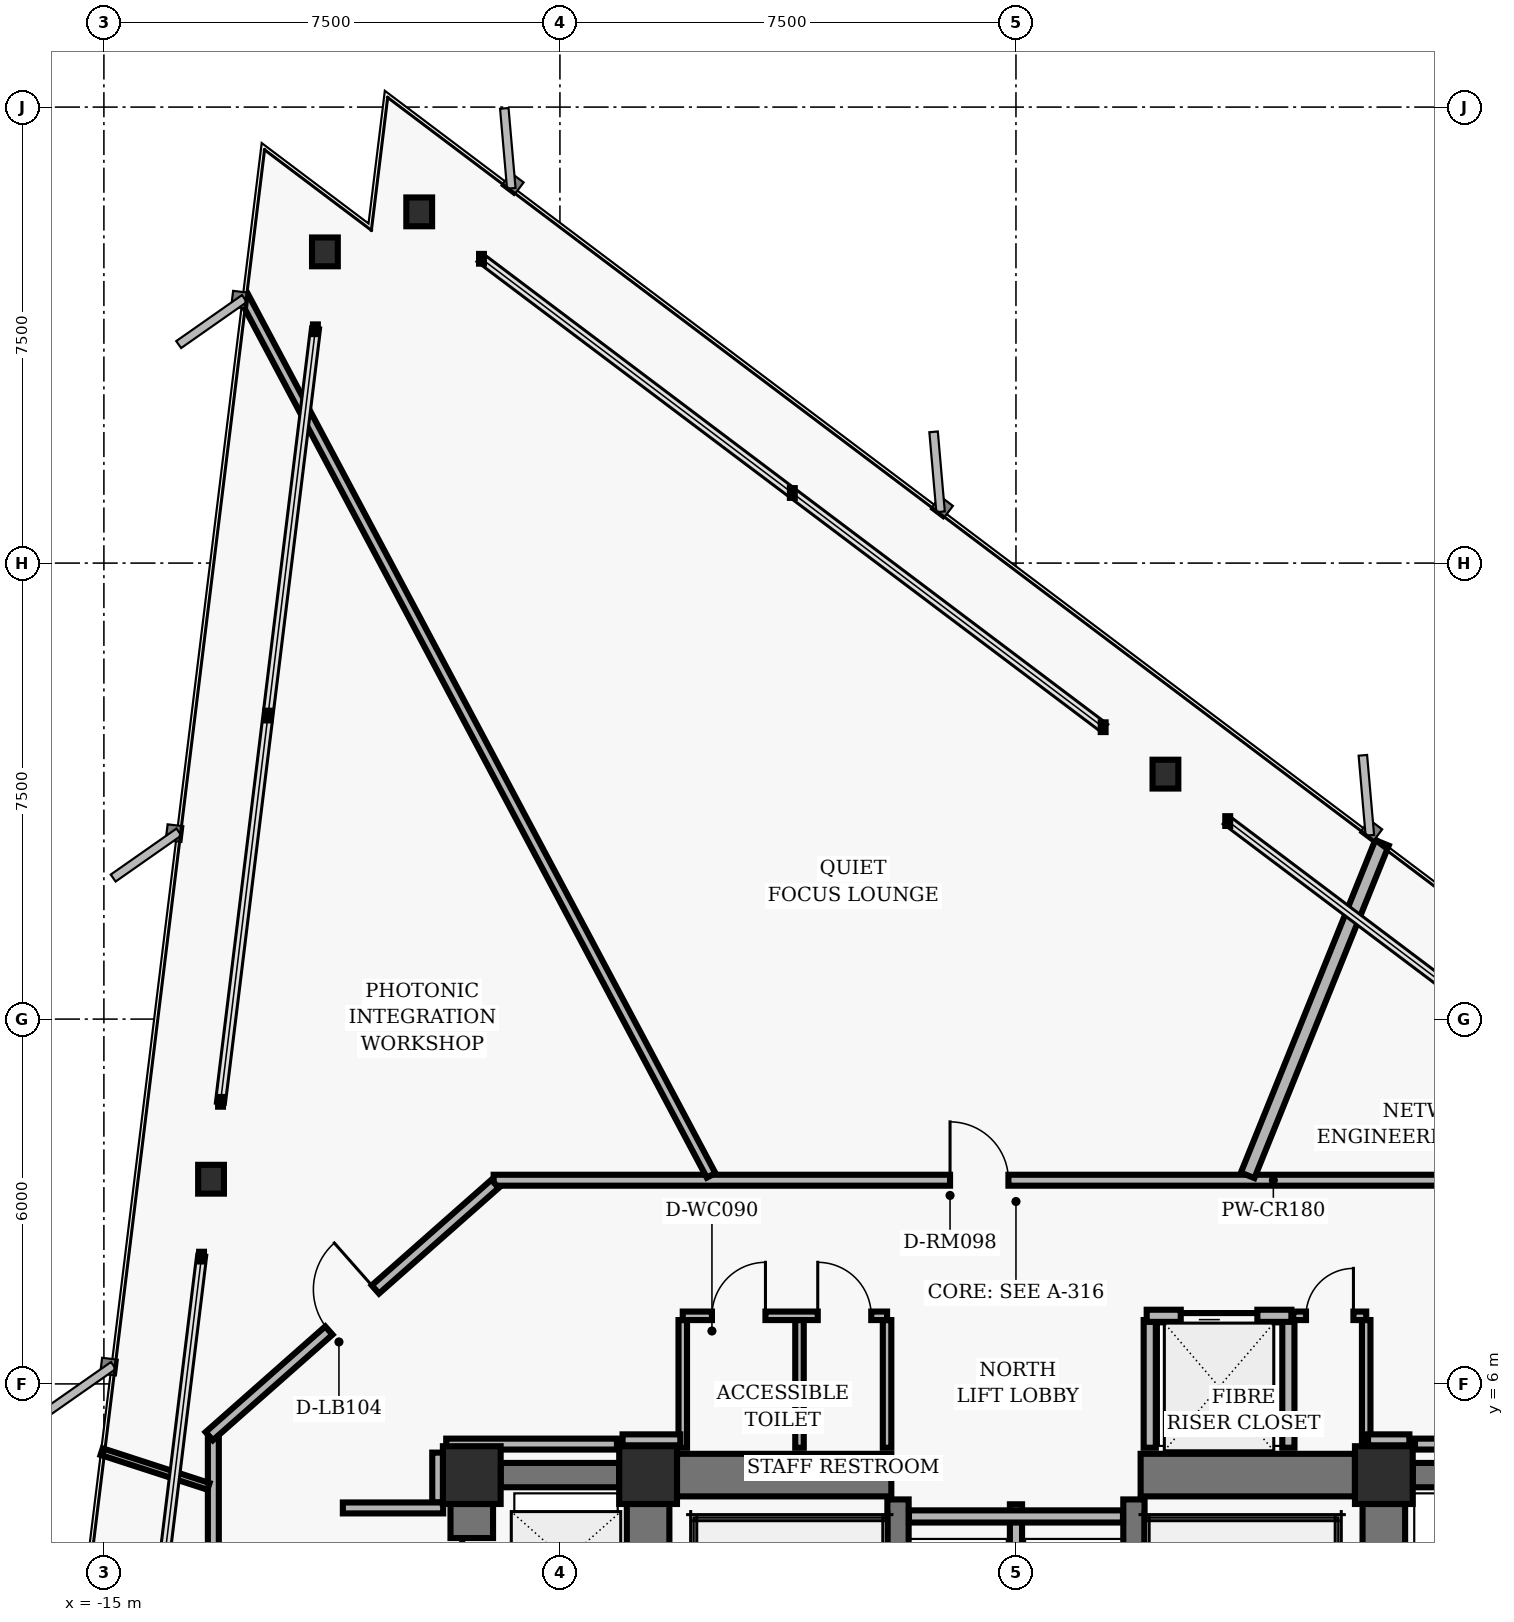
"""IFC4 building model, lengths in metres.
Left out: names, types, materials, properties, quantities, classifications, styles, units other than length and angle.
Written with IfcOpenShell. Run it as: python <this file> out.ifc"""

import sys

from ifc_helpers import new_model, si_unit, direction, frame, frame_2d, origin, origin_2d, place, context, subcontext, project, spatial, rectangle, hollow_rectangle, i_section, extrude, element, fill, save


model = new_model("IFC4")
c1 = context("Model", 3, precision=1e-05, world=origin(), true_north=direction((0.0, 1.0)))
c2 = subcontext(c1, "Body", "Model", "MODEL_VIEW")
j1 = project(units=[si_unit("LENGTHUNIT", "METRE"), si_unit("PLANEANGLEUNIT", "RADIAN")], contexts=[c1])
p1 = place(None, origin())
s1 = spatial("IfcSite", under=j1, at=p1, CompositionType="ELEMENT")
p2 = place(p1, origin())
s2 = spatial("IfcBuilding", under=s1, at=p2, CompositionType="ELEMENT")
p3 = place(p2, frame((0.0, 0.0, 56.32)))
s3 = spatial("IfcBuildingStorey", under=s2, at=p3, CompositionType="ELEMENT", Elevation=56.32)
for number, where, z_axis, x_axis in (
    (1, (-6.05, 4.5, 0.0), (0.0, 0.0, 1.0), (1.0, 0.0, 0.0)),
    (2, (6.05, 4.5, 0.0), (0.0, 0.0, 1.0), (1.0, 0.0, 0.0)),
    (3, (-8.95, 4.5, 0.0), (0.0, 0.0, 1.0), (1.0, 0.0, 0.0)),
):
    element("IfcColumn", number, at=place(p3, frame(where, z_axis=z_axis, x_axis=x_axis)), inside=s3, PredefinedType="COLUMN", context=c2, shape_type="SweptSolid", body=[
        extrude(hollow_rectangle(XDim=0.95, YDim=0.95, WallThickness=0.06, InnerFilletRadius=0.02, OuterFilletRadius=0.04, at=origin_2d()), origin(), (0.0, 0.0, 1.0), 3.36),
    ])
for number, where, z_axis, x_axis in (
    (4, (-6.05, 0.475, 0.0), (0.0, 0.0, 1.0), (0.0, 1.0, 0.0)),
    (5, (6.05, 0.475, 0.0), (0.0, 0.0, 1.0), (0.0, 1.0, 0.0)),
):
    element("IfcWall", number, at=place(p3, frame(where, z_axis=z_axis, x_axis=x_axis)), inside=s3, PredefinedType="SHEAR", context=c2, shape_type="SweptSolid", body=[
        extrude(rectangle(XDim=3.55, YDim=0.7, at=frame_2d((1.775, 0.0))), origin(), (0.0, 0.0, 1.0), 3.098),
    ])
for number, where, z_axis, x_axis in (
    (6, (-1.94, -4.1, 0.0), (0.0, 0.0, 1.0), (0.0, 1.0, 0.0)),
    (7, (1.94, -4.1, 0.0), (0.0, 0.0, 1.0), (0.0, 1.0, 0.0)),
):
    element("IfcWall", number, at=place(p3, frame(where, z_axis=z_axis, x_axis=x_axis)), inside=s3, PredefinedType="SHEAR", context=c2, shape_type="SweptSolid", body=[
        extrude(rectangle(XDim=8.2, YDim=0.35, at=frame_2d((4.1, 0.0))), origin(), (0.0, 0.0, 1.0), 3.098),
    ])
for number, where, z_axis, x_axis in (
    (8, (-5.575, 4.5, 0.0), (0.0, 0.0, 1.0), (1.0, 0.0, 0.0)),
    (9, (2.05, 4.5, 0.0), (0.0, 0.0, 1.0), (1.0, 0.0, 0.0)),
):
    element("IfcWall", number, at=place(p3, frame(where, z_axis=z_axis, x_axis=x_axis)), inside=s3, PredefinedType="SHEAR", context=c2, shape_type="SweptSolid", body=[
        extrude(rectangle(XDim=3.525, YDim=0.7, at=frame_2d((1.762, 0.0))), origin(), (0.0, 0.0, 1.0), 3.098),
    ])
p4 = place(p3, frame((-8.95, -3.825, 0.0), z_axis=(0.0, 0.0, 1.0), x_axis=(0.0, 1.0, 0.0)))
e10 = element("IfcWall", 10, at=p4, inside=s3, PredefinedType="SHEAR", context=c2, shape_type="SweptSolid", body=[
    extrude(rectangle(XDim=7.85, YDim=0.7, at=frame_2d((3.925, 0.0))), origin(), (0.0, 0.0, 1.0), 3.098),
])
p5 = place(p4, frame((0.55, 0.0, 0.0)))
e11 = element("IfcOpeningElement", 11, at=p5, cuts=e10, PredefinedType="OPENING", context=c2, shape_type="SweptSolid", body=[
    extrude(rectangle(XDim=1.06, YDim=2.04, at=frame_2d((0.53, 1.02))), frame((0.0, 0.36, 0.0), z_axis=(0.0, -1.0, 0.0), x_axis=(1.0, 0.0, 0.0)), (0.0, 0.0, 1.0), 0.72),
])
p6 = place(p4, frame((3.395, 0.0, 0.0)))
e12 = element("IfcOpeningElement", 12, at=p6, cuts=e10, PredefinedType="OPENING", context=c2, shape_type="SweptSolid", body=[
    extrude(rectangle(XDim=1.06, YDim=2.04, at=frame_2d((0.53, 1.02))), frame((0.0, 0.36, 0.0), z_axis=(0.0, -1.0, 0.0), x_axis=(1.0, 0.0, 0.0)), (0.0, 0.0, 1.0), 0.72),
])
p7 = place(p4, frame((6.23, 0.0, 0.0)))
e13 = element("IfcOpeningElement", 13, at=p7, cuts=e10, PredefinedType="OPENING", context=c2, shape_type="SweptSolid", body=[
    extrude(rectangle(XDim=1.06, YDim=2.04, at=frame_2d((0.53, 1.02))), frame((0.0, 0.36, 0.0), z_axis=(0.0, -1.0, 0.0), x_axis=(1.0, 0.0, 0.0)), (0.0, 0.0, 1.0), 0.72),
])
for number, where, z_axis, x_axis in (
    (14, (-8.475, 4.5, 0.0), (0.0, 0.0, 1.0), (1.0, 0.0, 0.0)),
    (15, (6.525, 4.5, 0.0), (0.0, 0.0, 1.0), (1.0, 0.0, 0.0)),
):
    element("IfcWall", number, at=place(p3, frame(where, z_axis=z_axis, x_axis=x_axis)), inside=s3, PredefinedType="SHEAR", context=c2, shape_type="SweptSolid", body=[
        extrude(rectangle(XDim=1.95, YDim=0.4, at=frame_2d((0.975, 0.0))), origin(), (0.0, 0.0, 1.0), 3.098),
    ])
for number, where, z_axis, x_axis in (
    (16, (2.458, 16.029, 0.0), (0.0, 0.0, 1.0), (1.0, 0.0, 0.0)),
    (17, (-9.814, 25.277, 0.0), (0.0, 0.0, 1.0), (1.0, 0.0, 0.0)),
    (18, (-11.365, 24.619, 0.0), (0.0, 0.0, 1.0), (1.0, 0.0, 0.0)),
    (19, (-13.238, 9.366, 0.0), (0.0, 0.0, 1.0), (1.0, 0.0, 0.0)),
):
    element("IfcColumn", number, at=place(p3, frame(where, z_axis=z_axis, x_axis=x_axis)), inside=s3, PredefinedType="COLUMN", context=c2, shape_type="SweptSolid", body=[
        extrude(i_section(OverallWidth=0.424, OverallDepth=0.474, WebThickness=0.048, FlangeThickness=0.077, FilletRadius=0.025, at=origin_2d()), origin(), (0.0, 0.0, 1.0), 3.36),
    ])
p8 = place(p3, frame((0.0, 1.25, 0.0), z_axis=(0.0, 0.0, 1.0), x_axis=(0.0, 1.0, 0.0)))
e20 = element("IfcWall", 20, at=p8, inside=s3, PredefinedType="PARTITIONING", context=c2, shape_type="SweptSolid", body=[
    extrude(rectangle(XDim=2.77, YDim=0.2, at=frame_2d((1.385, 0.0))), origin(), (0.0, 0.0, 1.0), 3.073),
])
p9 = place(p3, frame((-1.76, 3.82, 0.0), z_axis=(0.0, 0.0, 1.0), x_axis=(1.0, 0.0, 0.0)))
e21 = element("IfcWall", 21, at=p9, inside=s3, PredefinedType="PARTITIONING", context=c2, shape_type="SweptSolid", body=[
    extrude(rectangle(XDim=3.52, YDim=0.2, at=frame_2d((1.76, 0.0))), origin(), (0.0, 0.0, 1.0), 3.073),
])
for number, where, z_axis, x_axis in (
    (22, (2.2, 4.95, 0.0), (0.0, 0.0, 1.0), (0.0, 1.0, 0.0)),
    (23, (4.48, 4.95, 0.0), (0.0, 0.0, 1.0), (0.0, 1.0, 0.0)),
):
    element("IfcWall", number, at=place(p3, frame(where, z_axis=z_axis, x_axis=x_axis)), inside=s3, PredefinedType="PARTITIONING", context=c2, shape_type="SweptSolid", body=[
        extrude(rectangle(XDim=2.1, YDim=0.2, at=frame_2d((1.05, 0.0))), origin(), (0.0, 0.0, 1.0), 3.073),
    ])
p10 = place(p3, frame((2.15, 7.12, 0.0), z_axis=(0.0, 0.0, 1.0), x_axis=(1.0, 0.0, 0.0)))
e24 = element("IfcWall", 24, at=p10, inside=s3, PredefinedType="PARTITIONING", context=c2, shape_type="SweptSolid", body=[
    extrude(rectangle(XDim=2.38, YDim=0.2, at=frame_2d((1.19, 0.0))), origin(), (0.0, 0.0, 1.0), 2.587),
])
p11 = place(p10, frame((0.56, 0.0, 0.0)))
e25 = element("IfcOpeningElement", 25, at=p11, cuts=e24, PredefinedType="OPENING", context=c2, shape_type="SweptSolid", body=[
    extrude(rectangle(XDim=1.26, YDim=2.06, at=frame_2d((0.63, 1.03))), frame((0.0, 0.11, 0.0), z_axis=(0.0, -1.0, 0.0), x_axis=(1.0, 0.0, 0.0)), (0.0, 0.0, 1.0), 0.22),
])
for number, where, z_axis, x_axis in (
    (26, (-5.48, 4.95, 0.0), (0.0, 0.0, 1.0), (0.0, 1.0, 0.0)),
    (27, (-3.56, 4.95, 0.0), (0.0, 0.0, 1.0), (0.0, 1.0, 0.0)),
    (28, (-2.12, 4.95, 0.0), (0.0, 0.0, 1.0), (0.0, 1.0, 0.0)),
):
    element("IfcWall", number, at=place(p3, frame(where, z_axis=z_axis, x_axis=x_axis)), inside=s3, PredefinedType="PARTITIONING", context=c2, shape_type="SweptSolid", body=[
        extrude(rectangle(XDim=2.1, YDim=0.14, at=frame_2d((1.05, 0.0))), origin(), (0.0, 0.0, 1.0), 3.073),
    ])
p12 = place(p3, frame((-5.48, 7.12, 0.0), z_axis=(0.0, 0.0, 1.0), x_axis=(1.0, 0.0, 0.0)))
e29 = element("IfcWall", 29, at=p12, inside=s3, PredefinedType="PARTITIONING", context=c2, shape_type="SweptSolid", body=[
    extrude(rectangle(XDim=3.36, YDim=0.14, at=frame_2d((1.68, 0.0))), origin(), (0.0, 0.0, 1.0), 3.073),
])
p13 = place(p12, frame((0.48, 0.0, 0.0)))
e30 = element("IfcOpeningElement", 30, at=p13, cuts=e29, PredefinedType="OPENING", context=c2, shape_type="SweptSolid", body=[
    extrude(rectangle(XDim=0.88, YDim=2.02, at=frame_2d((0.44, 1.01))), frame((0.0, 0.08, 0.0), z_axis=(0.0, -1.0, 0.0), x_axis=(1.0, 0.0, 0.0)), (0.0, 0.0, 1.0), 0.16),
])
p14 = place(p12, frame((2.22, 0.0, 0.0)))
e31 = element("IfcOpeningElement", 31, at=p14, cuts=e29, PredefinedType="OPENING", context=c2, shape_type="SweptSolid", body=[
    extrude(rectangle(XDim=0.88, YDim=2.02, at=frame_2d((0.44, 1.01))), frame((0.0, 0.08, 0.0), z_axis=(0.0, -1.0, 0.0), x_axis=(1.0, 0.0, 0.0)), (0.0, 0.0, 1.0), 0.16),
])
p15 = place(p3, frame((5.76, 4.95, 0.0), z_axis=(0.0, 0.0, 1.0), x_axis=(0.0, 1.0, 0.0)))
e32 = element("IfcWall", 32, at=p15, inside=s3, PredefinedType="PARTITIONING", context=c2, shape_type="SweptSolid", body=[
    extrude(rectangle(XDim=2.1, YDim=0.14, at=frame_2d((1.05, 0.0))), origin(), (0.0, 0.0, 1.0), 3.073),
])
p16 = place(p3, frame((4.56, 7.12, 0.0), z_axis=(0.0, 0.0, 1.0), x_axis=(1.0, 0.0, 0.0)))
e33 = element("IfcWall", 33, at=p16, inside=s3, PredefinedType="PARTITIONING", context=c2, shape_type="SweptSolid", body=[
    extrude(rectangle(XDim=1.2, YDim=0.14, at=frame_2d((0.6, 0.0))), origin(), (0.0, 0.0, 1.0), 2.587),
])
p17 = place(p16, frame((0.21, 0.0, 0.0)))
e34 = element("IfcOpeningElement", 34, at=p17, cuts=e33, PredefinedType="OPENING", context=c2, shape_type="SweptSolid", body=[
    extrude(rectangle(XDim=0.78, YDim=2.01, at=frame_2d((0.39, 1.005))), frame((0.0, 0.08, 0.0), z_axis=(0.0, -1.0, 0.0), x_axis=(1.0, 0.0, 0.0)), (0.0, 0.0, 1.0), 0.16),
])
p18 = place(p3, frame((-8.59, 9.35, 0.0), z_axis=(0.0, 0.0, 1.0), x_axis=(1.0, 0.0, 0.0)))
e35 = element("IfcWall", 35, at=p18, inside=s3, PredefinedType="PARTITIONING", context=c2, shape_type="SweptSolid", body=[
    extrude(rectangle(XDim=17.18, YDim=0.18, at=frame_2d((8.59, 0.0))), origin(), (0.0, 0.0, 1.0), 3.073),
])
p19 = place(p18, frame((7.506, 0.0, 0.0)))
e36 = element("IfcOpeningElement", 36, at=p19, cuts=e35, PredefinedType="OPENING", context=c2, shape_type="SweptSolid", body=[
    extrude(rectangle(XDim=0.96, YDim=2.02, at=frame_2d((0.48, 1.01))), frame((0.0, 0.1, 0.0), z_axis=(0.0, -1.0, 0.0), x_axis=(1.0, 0.0, 0.0)), (0.0, 0.0, 1.0), 0.2),
])
p20 = place(p3, frame((-13.2, -5.11, 0.0), z_axis=(0.0, 0.0, 1.0), x_axis=(0.0, 1.0, 0.0)))
e37 = element("IfcWall", 37, at=p20, inside=s3, PredefinedType="PARTITIONING", context=c2, shape_type="SweptSolid", body=[
    extrude(rectangle(XDim=10.22, YDim=0.18, at=frame_2d((5.11, 0.0))), origin(), (0.0, 0.0, 1.0), 2.587),
])
p21 = place(p20, frame((5.132, 0.0, 0.0)))
e38 = element("IfcOpeningElement", 38, at=p21, cuts=e37, PredefinedType="OPENING", context=c2, shape_type="SweptSolid", body=[
    extrude(rectangle(XDim=0.96, YDim=2.02, at=frame_2d((0.48, 1.01))), frame((0.0, 0.1, 0.0), z_axis=(0.0, -1.0, 0.0), x_axis=(1.0, 0.0, 0.0)), (0.0, 0.0, 1.0), 0.2),
])
p22 = place(p3, frame((-13.268, 5.14, 0.0), z_axis=(0.0, 0.0, 1.0), x_axis=(0.749626463267, 0.66186113768, 0.0)))
e39 = element("IfcWall", 39, at=p22, inside=s3, PredefinedType="PARTITIONING", context=c2, shape_type="SweptSolid", body=[
    extrude(rectangle(XDim=6.27, YDim=0.18, at=frame_2d((3.135, 0.0))), origin(), (0.0, 0.0, 1.0), 3.073),
])
p23 = place(p22, frame((2.625, 0.0, 0.0)))
e40 = element("IfcOpeningElement", 40, at=p23, cuts=e39, PredefinedType="OPENING", context=c2, shape_type="SweptSolid", body=[
    extrude(rectangle(XDim=1.02, YDim=2.02, at=frame_2d((0.51, 1.01))), frame((0.0, 0.1, 0.0), z_axis=(0.0, -1.0, 0.0), x_axis=(1.0, 0.0, 0.0)), (0.0, 0.0, 1.0), 0.2),
])
p24 = place(p3, frame((-9.51, 4.87, 0.0), z_axis=(0.0, 0.0, 1.0), x_axis=(0.0, -1.0, 0.0)))
e41 = element("IfcWall", 41, at=p24, inside=s3, PredefinedType="PARTITIONING", context=c2, shape_type="SweptSolid", body=[
    extrude(rectangle(XDim=0.82, YDim=0.18, at=frame_2d((0.41, 0.0))), origin(), (0.0, 0.0, 1.0), 3.073),
])
p25 = place(p3, frame((-9.42, 3.96, 0.0), z_axis=(0.0, 0.0, 1.0), x_axis=(-1.0, 0.0, 0.0)))
e42 = element("IfcWall", 42, at=p25, inside=s3, PredefinedType="PARTITIONING", context=c2, shape_type="SweptSolid", body=[
    extrude(rectangle(XDim=1.65, YDim=0.18, at=frame_2d((0.825, 0.0))), origin(), (0.0, 0.0, 1.0), 3.073),
])
p26 = place(p3, frame((9.37, 5.01, 0.0), z_axis=(0.0, 0.0, 1.0), x_axis=(-1.0, 0.0, 0.0)))
e43 = element("IfcWall", 43, at=p26, inside=s3, PredefinedType="PARTITIONING", context=c2, shape_type="SweptSolid", body=[
    extrude(rectangle(XDim=2.808, YDim=0.18, at=frame_2d((1.404, 0.0))), origin(), (0.0, 0.0, 1.0), 3.073),
])
p27 = place(p3, frame((6.47, 5.08, 0.0), z_axis=(0.0, 0.0, 1.0), x_axis=(-1.0, 0.0, 0.0)))
e44 = element("IfcWall", 44, at=p27, inside=s3, PredefinedType="PARTITIONING", context=c2, shape_type="SweptSolid", body=[
    extrude(rectangle(XDim=0.68, YDim=0.18, at=frame_2d((0.34, 0.0))), origin(), (0.0, 0.0, 1.0), 3.073),
])
p28 = place(p3, frame((-5.52, 5.08, 0.0), z_axis=(0.0, 0.0, 1.0), x_axis=(-1.0, 0.0, 0.0)))
e45 = element("IfcWall", 45, at=p28, inside=s3, PredefinedType="PARTITIONING", context=c2, shape_type="SweptSolid", body=[
    extrude(rectangle(XDim=0.95, YDim=0.18, at=frame_2d((0.475, 0.0))), origin(), (0.0, 0.0, 1.0), 3.073),
])
p29 = place(p3, frame((-6.562, 5.01, 0.0), z_axis=(0.0, 0.0, 1.0), x_axis=(-1.0, 0.0, 0.0)))
e46 = element("IfcWall", 46, at=p29, inside=s3, PredefinedType="PARTITIONING", context=c2, shape_type="SweptSolid", body=[
    extrude(rectangle(XDim=2.808, YDim=0.18, at=frame_2d((1.404, 0.0))), origin(), (0.0, 0.0, 1.0), 3.073),
])
p30 = place(p3, frame((3.81, 9.43, 0.0), z_axis=(0.0, 0.0, 1.0), x_axis=(0.374593091461, 0.927189309596, 0.0)))
e47 = element("IfcWall", 47, at=p30, inside=s3, PredefinedType="PARTITIONING", context=c2, shape_type="SweptSolid", body=[
    extrude(rectangle(XDim=5.898, YDim=0.24, at=frame_2d((2.949, 0.0))), origin(), (0.0, 0.0, 1.0), 3.073),
])
p31 = place(p3, frame((-5.014, 9.43, 0.0), z_axis=(0.0, 0.0, 1.0), x_axis=(-0.469473054772, 0.882946799554, 0.0)))
e48 = element("IfcWall", 48, at=p31, inside=s3, PredefinedType="PARTITIONING", context=c2, shape_type="SweptSolid", body=[
    extrude(rectangle(XDim=16.379, YDim=0.16, at=frame_2d((8.19, 0.0))), origin(), (0.0, 0.0, 1.0), 3.073),
])
p32 = place(p3, frame((-13.28, 4.315, 0.0), z_axis=(0.0, 0.0, 1.0), x_axis=(-0.951047661396, 0.309044245624, 0.0)))
e49 = element("IfcWall", 49, at=p32, inside=s3, PredefinedType="MOVABLE", context=c2, shape_type="SweptSolid", body=[
    extrude(rectangle(XDim=1.848, YDim=0.115, at=frame_2d((0.924, 0.0))), origin(), (0.0, 0.0, 1.0), 3.073),
])
p33 = place(p11, origin())
e50 = element("IfcDoor", 50, at=p33, inside=s3, OperationType="SLIDING_TO_LEFT", PredefinedType="DOOR", context=c2, shape_type="SweptSolid", body=[
    extrude(rectangle(XDim=1.26, YDim=2.06, at=frame_2d((0.63, 1.03))), frame((0.0, 0.025, 0.0), z_axis=(0.0, -1.0, 0.0), x_axis=(1.0, 0.0, 0.0)), (0.0, 0.0, 1.0), 0.05),
])
fill(e25, e50)
p34 = place(p13, origin())
e51 = element("IfcDoor", 51, at=p34, inside=s3, OperationType="SINGLE_SWING_RIGHT", PredefinedType="DOOR", context=c2, shape_type="SweptSolid", body=[
    extrude(rectangle(XDim=0.88, YDim=2.02, at=frame_2d((0.44, 1.01))), frame((0.0, 0.025, 0.0), z_axis=(0.0, -1.0, 0.0), x_axis=(1.0, 0.0, 0.0)), (0.0, 0.0, 1.0), 0.05),
])
fill(e30, e51)
p35 = place(p14, origin())
e52 = element("IfcDoor", 52, at=p35, inside=s3, OperationType="SINGLE_SWING_LEFT", PredefinedType="DOOR", context=c2, shape_type="SweptSolid", body=[
    extrude(rectangle(XDim=0.88, YDim=2.02, at=frame_2d((0.44, 1.01))), frame((0.0, 0.025, 0.0), z_axis=(0.0, -1.0, 0.0), x_axis=(1.0, 0.0, 0.0)), (0.0, 0.0, 1.0), 0.05),
])
fill(e31, e52)
p36 = place(p17, origin())
e53 = element("IfcDoor", 53, at=p36, inside=s3, OperationType="SINGLE_SWING_RIGHT", PredefinedType="DOOR", context=c2, shape_type="SweptSolid", body=[
    extrude(rectangle(XDim=0.78, YDim=2.01, at=frame_2d((0.39, 1.005))), frame((0.0, 0.025, 0.0), z_axis=(0.0, -1.0, 0.0), x_axis=(1.0, 0.0, 0.0)), (0.0, 0.0, 1.0), 0.05),
])
fill(e34, e53)
p37 = place(p7, origin())
e54 = element("IfcDoor", 54, at=p37, inside=s3, OperationType="SLIDING_TO_LEFT", PredefinedType="DOOR", context=c2, shape_type="SweptSolid", body=[
    extrude(rectangle(XDim=1.06, YDim=2.04, at=frame_2d((0.53, 1.02))), frame((0.0, 0.025, 0.0), z_axis=(0.0, -1.0, 0.0), x_axis=(1.0, 0.0, 0.0)), (0.0, 0.0, 1.0), 0.05),
])
fill(e13, e54)
p38 = place(p19, origin())
e55 = element("IfcDoor", 55, at=p38, inside=s3, OperationType="SINGLE_SWING_LEFT", PredefinedType="DOOR", context=c2, shape_type="SweptSolid", body=[
    extrude(rectangle(XDim=0.96, YDim=2.02, at=frame_2d((0.48, 1.01))), frame((0.0, 0.025, 0.0), z_axis=(0.0, -1.0, 0.0), x_axis=(1.0, 0.0, 0.0)), (0.0, 0.0, 1.0), 0.05),
])
fill(e36, e55)
p39 = place(p23, origin())
e56 = element("IfcDoor", 56, at=p39, inside=s3, OperationType="SINGLE_SWING_RIGHT", PredefinedType="DOOR", context=c2, shape_type="SweptSolid", body=[
    extrude(rectangle(XDim=1.02, YDim=2.02, at=frame_2d((0.51, 1.01))), frame((0.0, 0.025, 0.0), z_axis=(0.0, -1.0, 0.0), x_axis=(1.0, 0.0, 0.0)), (0.0, 0.0, 1.0), 0.05),
])
fill(e40, e56)
save(model, sys.argv[1])
